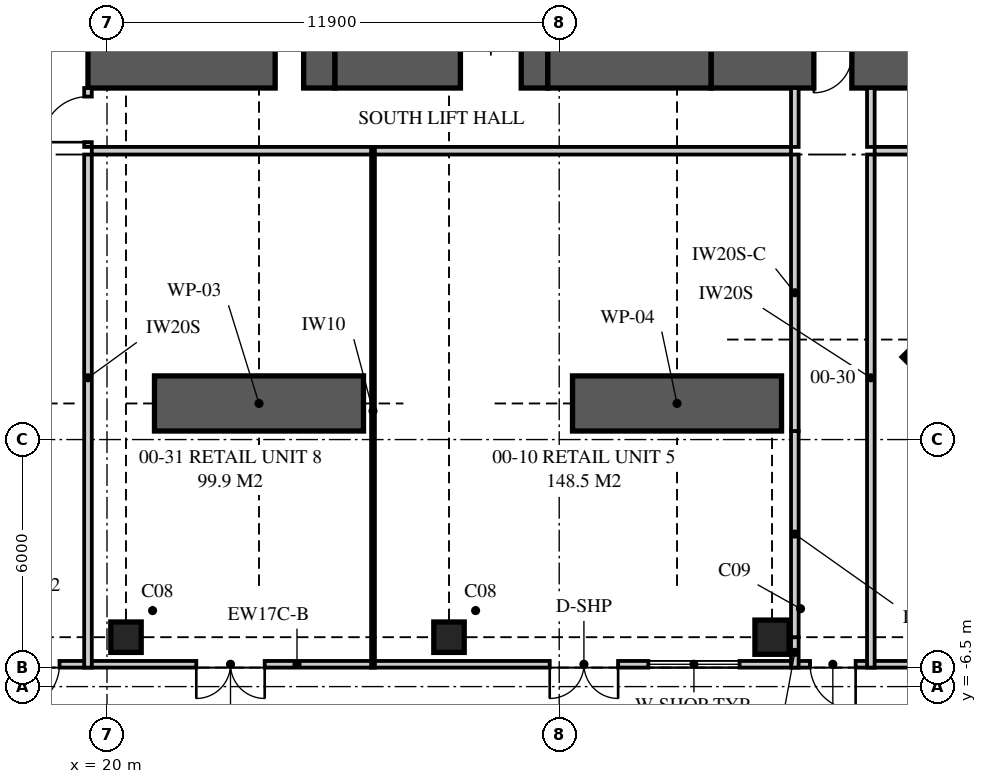
"""IFC4 building model, lengths in metres.
Left out: names, types, materials, properties, quantities, classifications, styles, units other than length and angle.
Written with IfcOpenShell. Run it as: python <this file> out.ifc"""

import sys

from ifc_helpers import new_model, si_unit, direction, frame, frame_2d, origin, origin_2d, place, context, subcontext, project, spatial, polyline, rectangle, outline, extrude, element, fill, save


model = new_model("IFC4")
c1 = context("Model", 3, precision=1e-05, world=origin(), true_north=direction((0.0, 1.0)))
c2 = subcontext(c1, "Body", "Model", "MODEL_VIEW")
j1 = project(units=[si_unit("LENGTHUNIT", "METRE"), si_unit("PLANEANGLEUNIT", "RADIAN")], contexts=[c1])
p1 = place(None, origin())
s1 = spatial("IfcSite", under=j1, at=p1, CompositionType="ELEMENT")
p2 = place(p1, origin())
s2 = spatial("IfcBuilding", under=s1, at=p2, CompositionType="ELEMENT")
p3 = place(p2, origin())
s3 = spatial("IfcBuildingStorey", under=s2, at=p3, CompositionType="ELEMENT", Elevation=0.0)
p4 = place(p3, frame((43.369, 2.631, 0.0), z_axis=(0.0, 0.0, 1.0), x_axis=(-0.707106781187, 0.707106781187, 0.0)))
e1 = element("IfcColumn", 1, at=p4, inside=s3, PredefinedType="COLUMN", context=c2, shape_type="SweptSolid", body=[
    extrude(rectangle(XDim=2.8, YDim=4.1, at=origin_2d()), origin(), (0.0, 0.0, 1.0), 6.0),
])
for number, where, z_axis, x_axis in (
    (2, (20.5, -5.2, 0.0), (0.0, 0.0, 1.0), (1.0, 0.0, 0.0)),
    (3, (29.0, -5.2, 0.0), (0.0, 0.0, 1.0), (1.0, 0.0, 0.0)),
):
    element("IfcColumn", number, at=place(p3, frame(where, z_axis=z_axis, x_axis=x_axis)), inside=s3, PredefinedType="COLUMN", context=c2, shape_type="SweptSolid", body=[
        extrude(rectangle(XDim=0.8, YDim=0.8, at=origin_2d()), origin(), (0.0, 0.0, 1.0), 6.0),
    ])
p5 = place(p3, frame((37.5, -5.2, 0.0), z_axis=(0.0, 0.0, 1.0), x_axis=(1.0, 0.0, 0.0)))
e4 = element("IfcColumn", 4, at=p5, inside=s3, PredefinedType="COLUMN", context=c2, shape_type="SweptSolid", body=[
    extrude(rectangle(XDim=0.9, YDim=0.9, at=origin_2d()), origin(), (0.0, 0.0, 1.0), 6.0),
])
p6 = place(p3, frame((19.5, 10.125, 0.0), z_axis=(0.0, 0.0, 1.0), x_axis=(1.0, 0.0, 0.0)))
e5 = element("IfcWall", 5, at=p6, inside=s3, PredefinedType="SHEAR", context=c2, shape_type="SweptSolid", body=[
    extrude(rectangle(XDim=6.5, YDim=1.75, at=frame_2d((3.25, 0.0))), origin(), (0.0, 0.0, 1.0), 6.0),
])
p7 = place(p6, frame((4.925, 0.0, 0.0)))
e6 = element("IfcOpeningElement", 6, at=p7, cuts=e5, PredefinedType="OPENING", context=c2, shape_type="SweptSolid", body=[
    extrude(rectangle(XDim=0.75, YDim=2.1, at=frame_2d((0.375, 1.05))), frame((0.0, 0.885, 0.0), z_axis=(0.0, -1.0, 0.0), x_axis=(1.0, 0.0, 0.0)), (0.0, 0.0, 1.0), 1.77),
])
p8 = place(p3, frame((26.0, 10.125, 0.0), z_axis=(0.0, 0.0, 1.0), x_axis=(1.0, 0.0, 0.0)))
e7 = element("IfcWall", 7, at=p8, inside=s3, PredefinedType="SHEAR", context=c2, shape_type="SweptSolid", body=[
    extrude(rectangle(XDim=5.6, YDim=1.75, at=frame_2d((2.8, 0.0))), origin(), (0.0, 0.0, 1.0), 6.0),
])
p9 = place(p8, frame((3.3, 0.0, 0.0)))
e8 = element("IfcOpeningElement", 8, at=p9, cuts=e7, PredefinedType="OPENING", context=c2, shape_type="SweptSolid", body=[
    extrude(rectangle(XDim=1.6, YDim=2.1, at=frame_2d((0.8, 1.05))), frame((0.0, 0.885, 0.0), z_axis=(0.0, -1.0, 0.0), x_axis=(1.0, 0.0, 0.0)), (0.0, 0.0, 1.0), 1.77),
])
p10 = place(p3, frame((31.6, 10.125, 0.0), z_axis=(0.0, 0.0, 1.0), x_axis=(1.0, 0.0, 0.0)))
e9 = element("IfcWall", 9, at=p10, inside=s3, PredefinedType="SHEAR", context=c2, shape_type="SweptSolid", body=[
    extrude(rectangle(XDim=4.3, YDim=1.75, at=frame_2d((2.15, 0.0))), origin(), (0.0, 0.0, 1.0), 6.0),
])
p11 = place(p3, frame((35.9, 10.125, 0.0), z_axis=(0.0, 0.0, 1.0), x_axis=(1.0, 0.0, 0.0)))
e10 = element("IfcWall", 10, at=p11, inside=s3, PredefinedType="SHEAR", context=c2, shape_type="SweptSolid", body=[
    extrude(rectangle(XDim=8.4, YDim=1.75, at=frame_2d((4.2, 0.0))), origin(), (0.0, 0.0, 1.0), 6.0),
])
p12 = place(p11, frame((2.7, 0.0, 0.0)))
e11 = element("IfcOpeningElement", 11, at=p12, cuts=e10, PredefinedType="OPENING", context=c2, shape_type="SweptSolid", body=[
    extrude(rectangle(XDim=1.0, YDim=2.1, at=frame_2d((0.5, 1.05))), frame((0.0, 0.885, 0.0), z_axis=(0.0, -1.0, 0.0), x_axis=(1.0, 0.0, 0.0)), (0.0, 0.0, 1.0), 1.77),
])
p13 = place(p3, frame((-9.2, -5.913, 0.0), z_axis=(0.0, 0.0, 1.0), x_axis=(1.0, 0.0, 0.0)))
e12 = element("IfcWall", 12, at=p13, inside=s3, PredefinedType="SOLIDWALL", context=c2, shape_type="SweptSolid", body=[
    extrude(rectangle(XDim=68.4, YDim=0.175, at=frame_2d((34.2, 0.0))), origin(), (0.0, 0.0, 1.0), 5.12),
])
p14 = place(p13, frame((4.819, 0.0, 0.0)))
e13 = element("IfcOpeningElement", 13, at=p14, cuts=e12, PredefinedType="OPENING", context=c2, shape_type="SweptSolid", body=[
    extrude(rectangle(XDim=1.8, YDim=2.7, at=frame_2d((0.9, 1.35))), frame((0.0, 0.097, 0.0), z_axis=(0.0, -1.0, 0.0), x_axis=(1.0, 0.0, 0.0)), (0.0, 0.0, 1.0), 0.195),
])
p15 = place(p13, frame((0.871, 0.0, 0.3)))
e14 = element("IfcOpeningElement", 14, at=p15, cuts=e12, PredefinedType="OPENING", context=c2, shape_type="SweptSolid", body=[
    extrude(rectangle(XDim=2.4, YDim=3.0, at=frame_2d((1.2, 1.5))), frame((0.0, 0.097, 0.0), z_axis=(0.0, -1.0, 0.0), x_axis=(1.0, 0.0, 0.0)), (0.0, 0.0, 1.0), 0.195),
])
p16 = place(p13, frame((8.334, 0.0, 0.3)))
e15 = element("IfcOpeningElement", 15, at=p16, cuts=e12, PredefinedType="OPENING", context=c2, shape_type="SweptSolid", body=[
    extrude(rectangle(XDim=2.4, YDim=3.0, at=frame_2d((1.2, 1.5))), frame((0.0, 0.097, 0.0), z_axis=(0.0, -1.0, 0.0), x_axis=(1.0, 0.0, 0.0)), (0.0, 0.0, 1.0), 0.195),
])
p17 = place(p13, frame((14.45, 0.0, 0.0)))
e16 = element("IfcOpeningElement", 16, at=p17, cuts=e12, PredefinedType="OPENING", context=c2, shape_type="SweptSolid", body=[
    extrude(rectangle(XDim=2.0, YDim=2.7, at=frame_2d((1.0, 1.35))), frame((0.0, 0.097, 0.0), z_axis=(0.0, -1.0, 0.0), x_axis=(1.0, 0.0, 0.0)), (0.0, 0.0, 1.0), 0.195),
])
p18 = place(p13, frame((22.17, 0.0, 0.0)))
e17 = element("IfcOpeningElement", 17, at=p18, cuts=e12, PredefinedType="OPENING", context=c2, shape_type="SweptSolid", body=[
    extrude(rectangle(XDim=1.8, YDim=2.7, at=frame_2d((0.9, 1.35))), frame((0.0, 0.097, 0.0), z_axis=(0.0, -1.0, 0.0), x_axis=(1.0, 0.0, 0.0)), (0.0, 0.0, 1.0), 0.195),
])
p19 = place(p13, frame((26.75, 0.0, 0.0)))
e18 = element("IfcOpeningElement", 18, at=p19, cuts=e12, PredefinedType="OPENING", context=c2, shape_type="SweptSolid", body=[
    extrude(rectangle(XDim=1.2, YDim=2.1, at=frame_2d((0.6, 1.05))), frame((0.0, 0.097, 0.0), z_axis=(0.0, -1.0, 0.0), x_axis=(1.0, 0.0, 0.0)), (0.0, 0.0, 1.0), 0.195),
])
p20 = place(p13, frame((31.55, 0.0, 0.0)))
e19 = element("IfcOpeningElement", 19, at=p20, cuts=e12, PredefinedType="OPENING", context=c2, shape_type="SweptSolid", body=[
    extrude(rectangle(XDim=1.8, YDim=2.7, at=frame_2d((0.9, 1.35))), frame((0.0, 0.097, 0.0), z_axis=(0.0, -1.0, 0.0), x_axis=(1.0, 0.0, 0.0)), (0.0, 0.0, 1.0), 0.195),
])
p21 = place(p13, frame((40.85, 0.0, 0.0)))
e20 = element("IfcOpeningElement", 20, at=p21, cuts=e12, PredefinedType="OPENING", context=c2, shape_type="SweptSolid", body=[
    extrude(rectangle(XDim=1.8, YDim=2.7, at=frame_2d((0.9, 1.35))), frame((0.0, 0.097, 0.0), z_axis=(0.0, -1.0, 0.0), x_axis=(1.0, 0.0, 0.0)), (0.0, 0.0, 1.0), 0.195),
])
p22 = place(p13, frame((43.445, 0.0, 0.3)))
e21 = element("IfcOpeningElement", 21, at=p22, cuts=e12, PredefinedType="OPENING", context=c2, shape_type="SweptSolid", body=[
    extrude(rectangle(XDim=2.4, YDim=3.0, at=frame_2d((1.2, 1.5))), frame((0.0, 0.097, 0.0), z_axis=(0.0, -1.0, 0.0), x_axis=(1.0, 0.0, 0.0)), (0.0, 0.0, 1.0), 0.195),
])
p23 = place(p13, frame((47.7, 0.0, 0.0)))
e22 = element("IfcOpeningElement", 22, at=p23, cuts=e12, PredefinedType="OPENING", context=c2, shape_type="SweptSolid", body=[
    extrude(rectangle(XDim=1.2, YDim=2.1, at=frame_2d((0.6, 1.05))), frame((0.0, 0.097, 0.0), z_axis=(0.0, -1.0, 0.0), x_axis=(1.0, 0.0, 0.0)), (0.0, 0.0, 1.0), 0.195),
])
p24 = place(p13, frame((52.485, 0.0, 0.0)))
e23 = element("IfcOpeningElement", 23, at=p24, cuts=e12, PredefinedType="OPENING", context=c2, shape_type="SweptSolid", body=[
    extrude(rectangle(XDim=1.8, YDim=2.7, at=frame_2d((0.9, 1.35))), frame((0.0, 0.097, 0.0), z_axis=(0.0, -1.0, 0.0), x_axis=(1.0, 0.0, 0.0)), (0.0, 0.0, 1.0), 0.195),
])
p25 = place(p13, frame((63.159, 0.0, 0.0)))
e24 = element("IfcOpeningElement", 24, at=p25, cuts=e12, PredefinedType="OPENING", context=c2, shape_type="SweptSolid", body=[
    extrude(rectangle(XDim=1.8, YDim=2.7, at=frame_2d((0.9, 1.35))), frame((0.0, 0.097, 0.0), z_axis=(0.0, -1.0, 0.0), x_axis=(1.0, 0.0, 0.0)), (0.0, 0.0, 1.0), 0.195),
])
p26 = place(p13, frame((58.92, 0.0, 0.3)))
e25 = element("IfcOpeningElement", 25, at=p26, cuts=e12, PredefinedType="OPENING", context=c2, shape_type="SweptSolid", body=[
    extrude(rectangle(XDim=2.4, YDim=3.0, at=frame_2d((1.2, 1.5))), frame((0.0, 0.097, 0.0), z_axis=(0.0, -1.0, 0.0), x_axis=(1.0, 0.0, 0.0)), (0.0, 0.0, 1.0), 0.195),
])
p27 = place(p3, frame((38.1, -6.0, 0.0), z_axis=(0.0, 0.0, 1.0), x_axis=(0.0, 1.0, 0.0)))
e26 = element("IfcWall", 26, at=p27, inside=s3, PredefinedType="SOLIDWALL", context=c2, shape_type="SweptSolid", body=[
    extrude(rectangle(XDim=0.8, YDim=0.2, at=frame_2d((0.4, 0.0))), origin(), (0.0, 0.0, 1.0), 5.12),
])
p28 = place(p3, frame((38.1, -5.2, 0.0), z_axis=(0.0, 0.0, 1.0), x_axis=(0.0, 1.0, 0.0)))
e27 = element("IfcWall", 27, at=p28, inside=s3, PredefinedType="SOLIDWALL", context=c2, shape_type="SweptSolid", body=[
    extrude(rectangle(XDim=5.425, YDim=0.2, at=frame_2d((2.712, 0.0))), origin(), (0.0, 0.0, 1.0), 5.12),
])
p29 = place(p3, frame((38.1, 0.225, 0.0), z_axis=(0.0, 0.0, 1.0), x_axis=(0.0, 1.0, 0.0)))
e28 = element("IfcWall", 28, at=p29, inside=s3, PredefinedType="SOLIDWALL", context=c2, shape_type="SweptSolid", body=[
    extrude(outline(polyline([(0.0, 0.0), (7.275, 0.0), (7.275, 5.72), (3.716, 5.72), (3.716, 5.12), (1.096, 5.12), (1.096, 5.72), (0.11, 5.72), (0.11, 5.12), (0.0, 5.12), (0.0, 0.0)])), frame((0.0, 0.1, 0.0), z_axis=(0.0, -1.0, 0.0), x_axis=(1.0, 0.0, 0.0)), (0.0, 0.0, 1.0), 0.2),
])
p30 = place(p3, frame((27.0, -6.0, 0.0), z_axis=(0.0, 0.0, 1.0), x_axis=(0.0, 1.0, 0.0)))
e29 = element("IfcWall", 29, at=p30, inside=s3, PredefinedType="PARTITIONING", context=c2, shape_type="SweptSolid", body=[
    extrude(outline(polyline([(0.0, 0.0), (13.5, 0.0), (13.5, 5.72), (8.21, 5.72), (8.21, 5.12), (5.69, 5.12), (5.69, 5.72), (2.06, 5.72), (2.06, 5.12), (0.0, 5.12), (0.0, 5.72), (0.0, 0.0)])), frame((0.0, 0.05, 0.0), z_axis=(0.0, -1.0, 0.0), x_axis=(1.0, 0.0, 0.0)), (0.0, 0.0, 1.0), 0.1),
])
p31 = place(p3, frame((27.05, 7.6, 0.0), z_axis=(0.0, 0.0, 1.0), x_axis=(1.0, 0.0, 0.0)))
e30 = element("IfcWall", 30, at=p31, inside=s3, PredefinedType="PARTITIONING", context=c2, shape_type="SweptSolid", body=[
    extrude(outline(polyline([(0.0, 0.0), (10.95, 0.0), (10.95, 5.72), (9.26, 5.72), (9.26, 5.12), (6.64, 5.12), (6.64, 5.72), (3.26, 5.72), (3.26, 5.12), (0.64, 5.12), (0.64, 5.72), (0.0, 5.72), (0.0, 0.0)])), frame((0.0, 0.1, 0.0), z_axis=(0.0, -1.0, 0.0), x_axis=(1.0, 0.0, 0.0)), (0.0, 0.0, 1.0), 0.2),
])
p32 = place(p3, frame((40.2, 7.6, 0.0), z_axis=(0.0, 0.0, 1.0), x_axis=(1.0, 0.0, 0.0)))
e31 = element("IfcWall", 31, at=p32, inside=s3, PredefinedType="PARTITIONING", context=c2, shape_type="SweptSolid", body=[
    extrude(outline(polyline([(0.0, 0.0), (5.9, 0.0), (5.9, 5.72), (4.479, 5.72), (4.479, 4.92), (1.859, 4.92), (1.859, 5.72), (0.0, 5.72), (0.0, 0.0)])), frame((0.0, 0.1, 0.0), z_axis=(0.0, -1.0, 0.0), x_axis=(1.0, 0.0, 0.0)), (0.0, 0.0, 1.0), 0.2),
])
p33 = place(p3, frame((40.1, 7.7, 0.0), z_axis=(0.0, 0.0, 1.0), x_axis=(0.0, 1.0, 0.0)))
e32 = element("IfcWall", 32, at=p33, inside=s3, PredefinedType="SOLIDWALL", context=c2, shape_type="SweptSolid", body=[
    extrude(rectangle(XDim=1.55, YDim=0.2, at=frame_2d((0.775, 0.0))), origin(), (0.0, 0.0, 1.0), 5.72),
])
p34 = place(p3, frame((40.1, -6.0, 0.0), z_axis=(0.0, 0.0, 1.0), x_axis=(0.0, 1.0, 0.0)))
e33 = element("IfcWall", 33, at=p34, inside=s3, PredefinedType="SOLIDWALL", context=c2, shape_type="SweptSolid", body=[
    extrude(outline(polyline([(0.0, 0.0), (13.5, 0.0), (13.5, 5.72), (9.941, 5.72), (9.941, 5.12), (7.321, 5.12), (7.321, 5.72), (2.11, 5.72), (2.11, 5.12), (0.0, 5.12), (0.0, 5.72), (0.0, 0.0)])), frame((0.0, 0.1, 0.0), z_axis=(0.0, -1.0, 0.0), x_axis=(1.0, 0.0, 0.0)), (0.0, 0.0, 1.0), 0.2),
])
p35 = place(p3, frame((38.1, 7.7, 0.0), z_axis=(0.0, 0.0, 1.0), x_axis=(0.0, 1.0, 0.0)))
e34 = element("IfcWall", 34, at=p35, inside=s3, PredefinedType="SOLIDWALL", context=c2, shape_type="SweptSolid", body=[
    extrude(rectangle(XDim=1.55, YDim=0.2, at=frame_2d((0.775, 0.0))), origin(), (0.0, 0.0, 1.0), 5.72),
])
p36 = place(p3, frame((19.5, -6.0, 0.0), z_axis=(0.0, 0.0, 1.0), x_axis=(0.0, 1.0, 0.0)))
e35 = element("IfcWall", 35, at=p36, inside=s3, PredefinedType="SOLIDWALL", context=c2, shape_type="SweptSolid", body=[
    extrude(outline(polyline([(0.0, 0.0), (13.5, 0.0), (13.5, 5.72), (13.5, 5.12), (2.11, 5.12), (0.0, 5.12), (0.0, 5.72), (0.0, 0.0)])), frame((0.0, 0.1, 0.0), z_axis=(0.0, -1.0, 0.0), x_axis=(1.0, 0.0, 0.0)), (0.0, 0.0, 1.0), 0.2),
])
p37 = place(p3, frame((19.6, 7.6, 0.0), z_axis=(0.0, 0.0, 1.0), x_axis=(1.0, 0.0, 0.0)))
e36 = element("IfcWall", 36, at=p37, inside=s3, PredefinedType="PARTITIONING", context=c2, shape_type="SweptSolid", body=[
    extrude(outline(polyline([(0.0, 0.0), (7.35, 0.0), (7.35, 5.72), (5.71, 5.72), (5.71, 5.12), (3.09, 5.12), (3.09, 5.72), (2.21, 5.72), (2.21, 5.12), (0.0, 5.12), (0.0, 5.72), (0.0, 0.0)])), frame((0.0, 0.1, 0.0), z_axis=(0.0, -1.0, 0.0), x_axis=(1.0, 0.0, 0.0)), (0.0, 0.0, 1.0), 0.2),
])
p38 = place(p3, frame((19.5, 7.7, 0.0), z_axis=(0.0, 0.0, 1.0), x_axis=(0.0, 1.0, 0.0)))
e37 = element("IfcWall", 37, at=p38, inside=s3, PredefinedType="SOLIDWALL", context=c2, shape_type="SweptSolid", body=[
    extrude(outline(polyline([(0.0, 0.0), (1.55, 0.0), (1.55, 5.72), (1.55, 5.12), (0.0, 5.12), (0.0, 5.72), (0.0, 0.0)])), frame((0.0, 0.1, 0.0), z_axis=(0.0, -1.0, 0.0), x_axis=(1.0, 0.0, 0.0)), (0.0, 0.0, 1.0), 0.2),
])
p39 = place(p38, frame((0.125, 0.0, 0.0)))
e38 = element("IfcOpeningElement", 38, at=p39, cuts=e37, PredefinedType="OPENING", context=c2, shape_type="SweptSolid", body=[
    extrude(rectangle(XDim=1.2, YDim=2.2, at=frame_2d((0.6, 1.1))), frame((0.0, 0.11, 0.0), z_axis=(0.0, -1.0, 0.0), x_axis=(1.0, 0.0, 0.0)), (0.0, 0.0, 1.0), 0.22),
])
for number, where, z_axis, x_axis in (
    (39, (21.25, 0.95, 0.0), (0.0, 0.0, 1.0), (1.0, 0.0, 0.0)),
    (40, (32.25, 0.95, 0.0), (0.0, 0.0, 1.0), (1.0, 0.0, 0.0)),
):
    element("IfcWall", number, at=place(p3, frame(where, z_axis=z_axis, x_axis=x_axis)), inside=s3, PredefinedType="SHEAR", context=c2, shape_type="SweptSolid", body=[
        extrude(rectangle(XDim=5.5, YDim=1.45, at=frame_2d((2.75, 0.0))), origin(), (0.0, 0.0, 1.0), 6.0),
    ])
p40 = place(p19, frame((1.2, 0.0, 0.0), z_axis=(0.0, 0.0, 1.0), x_axis=(-1.0, 0.0, 0.0)))
e41 = element("IfcDoor", 41, at=p40, inside=s3, OperationType="SINGLE_SWING_RIGHT", PredefinedType="DOOR", context=c2, shape_type="SweptSolid", body=[
    extrude(rectangle(XDim=1.2, YDim=2.1, at=frame_2d((0.6, 1.05))), frame((0.0, 0.025, 0.0), z_axis=(0.0, -1.0, 0.0), x_axis=(1.0, 0.0, 0.0)), (0.0, 0.0, 1.0), 0.05),
])
fill(e18, e41)
p41 = place(p20, frame((1.8, 0.0, 0.0), z_axis=(0.0, 0.0, 1.0), x_axis=(-1.0, 0.0, 0.0)))
e42 = element("IfcDoor", 42, at=p41, inside=s3, OperationType="DOUBLE_DOOR_SINGLE_SWING", PredefinedType="DOOR", context=c2, shape_type="SweptSolid", body=[
    extrude(rectangle(XDim=1.8, YDim=2.7, at=frame_2d((0.9, 1.35))), frame((0.0, 0.025, 0.0), z_axis=(0.0, -1.0, 0.0), x_axis=(1.0, 0.0, 0.0)), (0.0, 0.0, 1.0), 0.05),
])
fill(e19, e42)
p42 = place(p21, frame((1.8, 0.0, 0.0), z_axis=(0.0, 0.0, 1.0), x_axis=(-1.0, 0.0, 0.0)))
e43 = element("IfcDoor", 43, at=p42, inside=s3, OperationType="DOUBLE_DOOR_SINGLE_SWING", PredefinedType="DOOR", context=c2, shape_type="SweptSolid", body=[
    extrude(rectangle(XDim=1.8, YDim=2.7, at=frame_2d((0.9, 1.35))), frame((0.0, 0.025, 0.0), z_axis=(0.0, -1.0, 0.0), x_axis=(1.0, 0.0, 0.0)), (0.0, 0.0, 1.0), 0.05),
])
fill(e20, e43)
p43 = place(p22, origin())
e44 = element("IfcWindow", 44, at=p43, inside=s3, PartitioningType="SINGLE_PANEL", PredefinedType="WINDOW", context=c2, shape_type="SweptSolid", body=[
    extrude(rectangle(XDim=2.4, YDim=3.0, at=frame_2d((1.2, 1.5))), frame((0.0, 0.03, 0.0), z_axis=(0.0, -1.0, 0.0), x_axis=(1.0, 0.0, 0.0)), (0.0, 0.0, 1.0), 0.06),
])
fill(e21, e44)
p44 = place(p23, frame((1.2, 0.0, 0.0), z_axis=(0.0, 0.0, 1.0), x_axis=(-1.0, 0.0, 0.0)))
e45 = element("IfcDoor", 45, at=p44, inside=s3, OperationType="SINGLE_SWING_LEFT", PredefinedType="DOOR", context=c2, shape_type="SweptSolid", body=[
    extrude(rectangle(XDim=1.2, YDim=2.1, at=frame_2d((0.6, 1.05))), frame((0.0, 0.025, 0.0), z_axis=(0.0, -1.0, 0.0), x_axis=(1.0, 0.0, 0.0)), (0.0, 0.0, 1.0), 0.05),
])
fill(e22, e45)
p45 = place(p39, origin())
e46 = element("IfcDoor", 46, at=p45, inside=s3, OperationType="SINGLE_SWING_LEFT", PredefinedType="DOOR", context=c2, shape_type="SweptSolid", body=[
    extrude(rectangle(XDim=1.2, YDim=2.2, at=frame_2d((0.6, 1.1))), frame((0.0, 0.025, 0.0), z_axis=(0.0, -1.0, 0.0), x_axis=(1.0, 0.0, 0.0)), (0.0, 0.0, 1.0), 0.05),
])
fill(e38, e46)
p46 = place(p9, origin())
e47 = element("IfcDoor", 47, at=p46, inside=s3, OperationType="DOUBLE_DOOR_SINGLE_SWING", PredefinedType="DOOR", context=c2, shape_type="SweptSolid", body=[
    extrude(rectangle(XDim=1.6, YDim=2.1, at=frame_2d((0.8, 1.05))), frame((0.0, 0.025, 0.0), z_axis=(0.0, -1.0, 0.0), x_axis=(1.0, 0.0, 0.0)), (0.0, 0.0, 1.0), 0.05),
])
fill(e8, e47)
p47 = place(p12, frame((1.0, 0.0, 0.0), z_axis=(0.0, 0.0, 1.0), x_axis=(-1.0, 0.0, 0.0)))
e48 = element("IfcDoor", 48, at=p47, inside=s3, OperationType="SINGLE_SWING_RIGHT", PredefinedType="DOOR", context=c2, shape_type="SweptSolid", body=[
    extrude(rectangle(XDim=1.0, YDim=2.1, at=frame_2d((0.5, 1.05))), frame((0.0, 0.025, 0.0), z_axis=(0.0, -1.0, 0.0), x_axis=(1.0, 0.0, 0.0)), (0.0, 0.0, 1.0), 0.05),
])
fill(e11, e48)
p48 = place(p7, origin())
e49 = element("IfcDoor", 49, at=p48, inside=s3, OperationType="SINGLE_SWING_LEFT", PredefinedType="DOOR", context=c2, shape_type="SweptSolid", body=[
    extrude(rectangle(XDim=0.75, YDim=2.1, at=frame_2d((0.375, 1.05))), frame((0.0, 0.025, 0.0), z_axis=(0.0, -1.0, 0.0), x_axis=(1.0, 0.0, 0.0)), (0.0, 0.0, 1.0), 0.05),
])
fill(e6, e49)
save(model, sys.argv[1])
